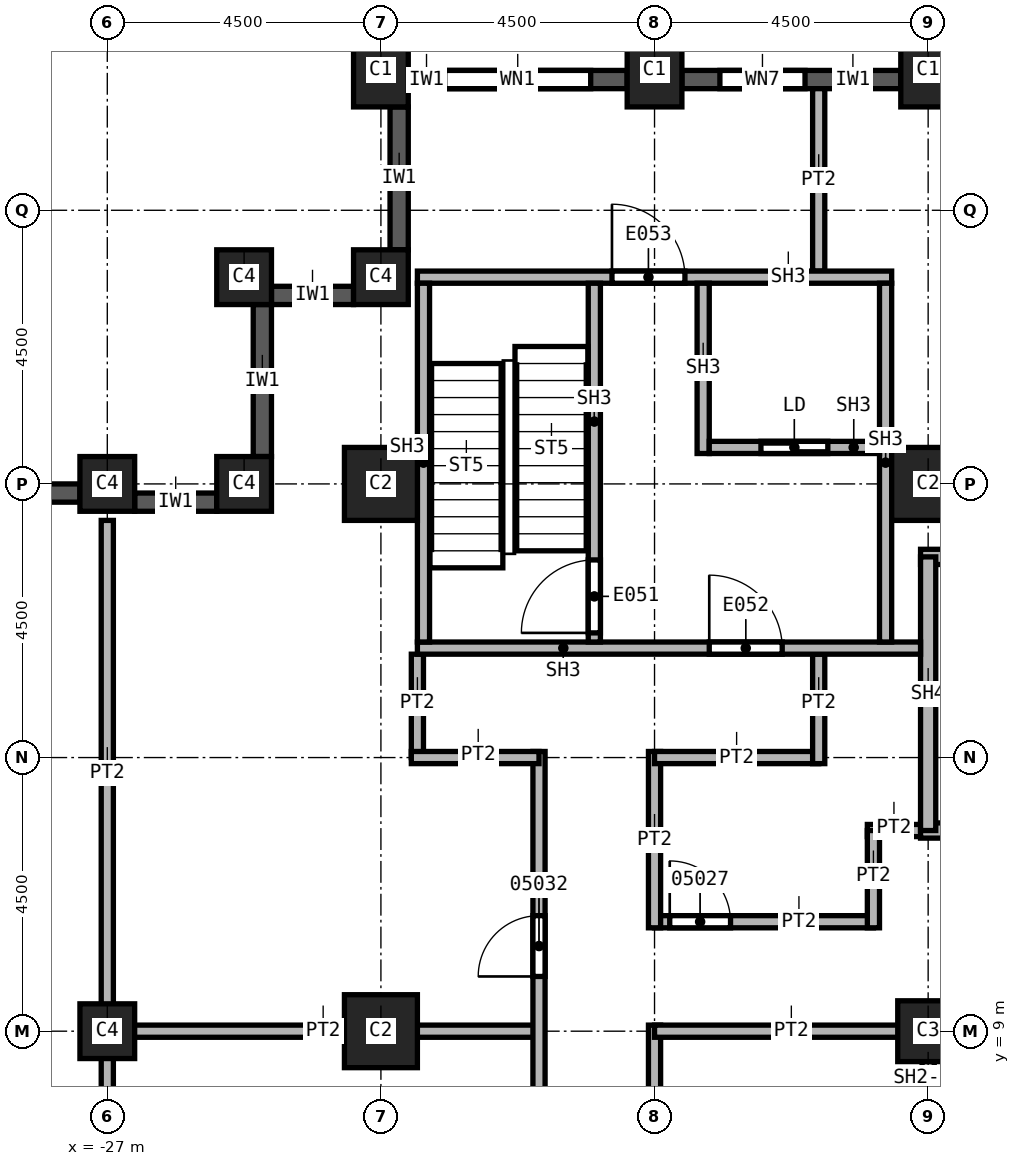
"""IFC4 building model, lengths in metres.
Left out: names, types, materials, properties, quantities, classifications, styles, units other than length and angle.
Written with IfcOpenShell. Run it as: python <this file> out.ifc"""

import sys

from ifc_helpers import new_model, si_unit, direction, frame, frame_2d, origin, origin_2d, place, context, subcontext, project, spatial, rectangle, extrude, element, fill, save


model = new_model("IFC4")
c1 = context("Model", 3, precision=1e-05, world=origin(), true_north=direction((0.0, 1.0)))
c2 = subcontext(c1, "Body", "Model", "MODEL_VIEW")
j1 = project(units=[si_unit("LENGTHUNIT", "METRE"), si_unit("PLANEANGLEUNIT", "RADIAN")], contexts=[c1])
p1 = place(None, origin())
s1 = spatial("IfcSite", under=j1, at=p1, CompositionType="ELEMENT")
p2 = place(p1, origin())
s2 = spatial("IfcBuilding", under=s1, at=p2, CompositionType="ELEMENT")
p3 = place(p2, frame((0.0, 0.0, 112.0)))
s3 = spatial("IfcBuildingStorey", under=s2, at=p3, CompositionType="ELEMENT", Elevation=112.0)
for number, where, z_axis, x_axis in (
    (1, (-13.5, 18.0, 0.0), (0.0, 0.0, 1.0), (1.0, 0.0, 0.0)),
    (2, (-22.5, 9.0, 0.0), (0.0, 0.0, 1.0), (1.0, 0.0, 0.0)),
    (3, (-22.5, 18.0, 0.0), (0.0, 0.0, 1.0), (1.0, 0.0, 0.0)),
):
    element("IfcColumn", number, at=place(p3, frame(where, z_axis=z_axis, x_axis=x_axis)), inside=s3, PredefinedType="COLUMN", context=c2, shape_type="SweptSolid", body=[
        extrude(rectangle(XDim=1.2, YDim=1.2, at=origin_2d()), origin(), (0.0, 0.0, 1.0), 3.7),
    ])
p4 = place(p3, frame((-13.5, 9.0, 0.0), z_axis=(0.0, 0.0, 1.0), x_axis=(1.0, 0.0, 0.0)))
e4 = element("IfcColumn", 4, at=p4, inside=s3, PredefinedType="COLUMN", context=c2, shape_type="SweptSolid", body=[
    extrude(rectangle(XDim=1.0, YDim=1.0, at=origin_2d()), origin(), (0.0, 0.0, 1.0), 3.7),
])
for number, where, z_axis, x_axis in (
    (5, (-13.5, 24.8, 0.0), (0.0, 0.0, 1.0), (1.0, 0.0, 0.0)),
    (6, (-18.0, 24.8, 0.0), (0.0, 0.0, 1.0), (1.0, 0.0, 0.0)),
    (7, (-22.5, 24.8, 0.0), (0.0, 0.0, 1.0), (1.0, 0.0, 0.0)),
):
    element("IfcColumn", number, at=place(p3, frame(where, z_axis=z_axis, x_axis=x_axis)), inside=s3, PredefinedType="COLUMN", context=c2, shape_type="SweptSolid", body=[
        extrude(rectangle(XDim=0.9, YDim=1.2, at=origin_2d()), origin(), (0.0, 0.0, 1.0), 3.7),
    ])
for number, where, z_axis, x_axis in (
    (8, (-27.0, 9.0, 0.0), (0.0, 0.0, 1.0), (1.0, 0.0, 0.0)),
    (9, (-27.0, 18.0, 0.0), (0.0, 0.0, 1.0), (1.0, 0.0, 0.0)),
    (10, (-22.5, 21.4, 0.0), (0.0, 0.0, 1.0), (1.0, 0.0, 0.0)),
    (11, (-24.75, 21.4, 0.0), (0.0, 0.0, 1.0), (1.0, 0.0, 0.0)),
    (12, (-24.75, 18.0, 0.0), (0.0, 0.0, 1.0), (1.0, 0.0, 0.0)),
):
    element("IfcColumn", number, at=place(p3, frame(where, z_axis=z_axis, x_axis=x_axis)), inside=s3, PredefinedType="COLUMN", context=c2, shape_type="SweptSolid", body=[
        extrude(rectangle(XDim=0.9, YDim=0.9, at=origin_2d()), origin(), (0.0, 0.0, 1.0), 3.7),
    ])
p5 = place(p3, frame((-22.2, 24.2, 0.0), z_axis=(0.0, 0.0, 1.0), x_axis=(0.0, -1.0, 0.0)))
e13 = element("IfcWall", 13, at=p5, inside=s3, PredefinedType="SOLIDWALL", context=c2, shape_type="SweptSolid", body=[
    extrude(rectangle(XDim=2.35, YDim=0.3, at=frame_2d((1.175, 0.0))), origin(), (0.0, 0.0, 1.0), 3.1),
])
p6 = place(p3, frame((-22.95, 21.1, 0.0), z_axis=(0.0, 0.0, 1.0), x_axis=(-1.0, 0.0, 0.0)))
e14 = element("IfcWall", 14, at=p6, inside=s3, PredefinedType="SOLIDWALL", context=c2, shape_type="SweptSolid", body=[
    extrude(rectangle(XDim=1.35, YDim=0.3, at=frame_2d((0.675, 0.0))), origin(), (0.0, 0.0, 1.0), 3.1),
])
p7 = place(p3, frame((-24.45, 20.95, 0.0), z_axis=(0.0, 0.0, 1.0), x_axis=(0.0, -1.0, 0.0)))
e15 = element("IfcWall", 15, at=p7, inside=s3, PredefinedType="SOLIDWALL", context=c2, shape_type="SweptSolid", body=[
    extrude(rectangle(XDim=2.5, YDim=0.3, at=frame_2d((1.25, 0.0))), origin(), (0.0, 0.0, 1.0), 3.1),
])
p8 = place(p3, frame((-25.2, 17.7, 0.0), z_axis=(0.0, 0.0, 1.0), x_axis=(-1.0, 0.0, 0.0)))
e16 = element("IfcWall", 16, at=p8, inside=s3, PredefinedType="SOLIDWALL", context=c2, shape_type="SweptSolid", body=[
    extrude(rectangle(XDim=1.35, YDim=0.3, at=frame_2d((0.675, 0.0))), origin(), (0.0, 0.0, 1.0), 3.1),
])
p9 = place(p3, frame((-27.45, 17.85, 0.0), z_axis=(0.0, 0.0, 1.0), x_axis=(-1.0, 0.0, 0.0)))
e17 = element("IfcWall", 17, at=p9, inside=s3, PredefinedType="SOLIDWALL", context=c2, shape_type="SweptSolid", body=[
    extrude(rectangle(XDim=3.6, YDim=0.3, at=frame_2d((1.8, 0.0))), origin(), (0.0, 0.0, 1.0), 3.1),
])
p10 = place(p9, frame((0.6, 0.0, 0.8)))
e18 = element("IfcOpeningElement", 18, at=p10, cuts=e17, PredefinedType="OPENING", context=c2, shape_type="SweptSolid", body=[
    extrude(rectangle(XDim=2.4, YDim=1.95, at=frame_2d((1.2, 0.975))), frame((0.0, 0.15, 0.0), z_axis=(0.0, -1.0, 0.0), x_axis=(1.0, 0.0, 0.0)), (0.0, 0.0, 1.0), 0.3),
])
p11 = place(p3, frame((-13.95, 24.65, 0.0), z_axis=(0.0, 0.0, 1.0), x_axis=(-1.0, 0.0, 0.0)))
e19 = element("IfcWall", 19, at=p11, inside=s3, PredefinedType="SOLIDWALL", context=c2, shape_type="SweptSolid", body=[
    extrude(rectangle(XDim=3.6, YDim=0.3, at=frame_2d((1.8, 0.0))), origin(), (0.0, 0.0, 1.0), 3.1),
])
p12 = place(p11, frame((1.575, 0.0, 0.8)))
e20 = element("IfcOpeningElement", 20, at=p12, cuts=e19, PredefinedType="OPENING", context=c2, shape_type="SweptSolid", body=[
    extrude(rectangle(XDim=1.4, YDim=1.95, at=frame_2d((0.7, 0.975))), frame((0.0, 0.15, 0.0), z_axis=(0.0, -1.0, 0.0), x_axis=(1.0, 0.0, 0.0)), (0.0, 0.0, 1.0), 0.3),
])
p13 = place(p3, frame((-18.45, 24.65, 0.0), z_axis=(0.0, 0.0, 1.0), x_axis=(-1.0, 0.0, 0.0)))
e21 = element("IfcWall", 21, at=p13, inside=s3, PredefinedType="SOLIDWALL", context=c2, shape_type="SweptSolid", body=[
    extrude(rectangle(XDim=3.6, YDim=0.3, at=frame_2d((1.8, 0.0))), origin(), (0.0, 0.0, 1.0), 3.1),
])
p14 = place(p13, frame((0.6, 0.0, 0.8)))
e22 = element("IfcOpeningElement", 22, at=p14, cuts=e21, PredefinedType="OPENING", context=c2, shape_type="SweptSolid", body=[
    extrude(rectangle(XDim=2.4, YDim=1.95, at=frame_2d((1.2, 0.975))), frame((0.0, 0.15, 0.0), z_axis=(0.0, -1.0, 0.0), x_axis=(1.0, 0.0, 0.0)), (0.0, 0.0, 1.0), 0.3),
])
p15 = place(p3, frame((-27.1, 9.0, 0.0), z_axis=(0.0, 0.0, 1.0), x_axis=(1.0, 0.0, 0.0)))
e23 = element("IfcWall", 23, at=p15, inside=s3, PredefinedType="PARTITIONING", context=c2, shape_type="SweptSolid", body=[
    extrude(rectangle(XDim=7.2, YDim=0.2, at=frame_2d((3.6, 0.0))), origin(), (0.0, 0.0, 1.0), 3.7),
])
p16 = place(p3, frame((-27.0, 3.75, 0.0), z_axis=(0.0, 0.0, 1.0), x_axis=(0.0, 1.0, 0.0)))
e24 = element("IfcWall", 24, at=p16, inside=s3, PredefinedType="PARTITIONING", context=c2, shape_type="SweptSolid", body=[
    extrude(rectangle(XDim=13.65, YDim=0.2, at=frame_2d((6.825, 0.0))), origin(), (0.0, 0.0, 1.0), 3.7),
])
p17 = place(p3, frame((-21.9, 13.5, 0.0), z_axis=(0.0, 0.0, 1.0), x_axis=(0.0, 1.0, 0.0)))
e25 = element("IfcWall", 25, at=p17, inside=s3, PredefinedType="PARTITIONING", context=c2, shape_type="SweptSolid", body=[
    extrude(rectangle(XDim=1.7, YDim=0.2, at=frame_2d((0.85, 0.0))), origin(), (0.0, 0.0, 1.0), 3.7),
])
p18 = place(p3, frame((-19.9, 3.65, 0.0), z_axis=(0.0, 0.0, 1.0), x_axis=(0.0, 1.0, 0.0)))
e26 = element("IfcWall", 26, at=p18, inside=s3, PredefinedType="PARTITIONING", context=c2, shape_type="SweptSolid", body=[
    extrude(rectangle(XDim=9.95, YDim=0.2, at=frame_2d((4.975, 0.0))), origin(), (0.0, 0.0, 1.0), 3.7),
])
p19 = place(p18, frame((6.25, 0.0, 0.0)))
e27 = element("IfcOpeningElement", 27, at=p19, cuts=e26, PredefinedType="OPENING", context=c2, shape_type="SweptSolid", body=[
    extrude(rectangle(XDim=1.0, YDim=2.1, at=frame_2d((0.5, 1.05))), frame((0.0, 0.1, 0.0), z_axis=(0.0, -1.0, 0.0), x_axis=(1.0, 0.0, 0.0)), (0.0, 0.0, 1.0), 0.2),
])
p20 = place(p3, frame((-19.9, 13.5, 0.0), z_axis=(0.0, 0.0, 1.0), x_axis=(-1.0, 0.0, 0.0)))
e28 = element("IfcWall", 28, at=p20, inside=s3, PredefinedType="PARTITIONING", context=c2, shape_type="SweptSolid", body=[
    extrude(rectangle(XDim=2.1, YDim=0.2, at=frame_2d((1.05, 0.0))), origin(), (0.0, 0.0, 1.0), 3.7),
])
p21 = place(p3, frame((-18.0, 9.1, 0.0), z_axis=(0.0, 0.0, 1.0), x_axis=(0.0, -1.0, 0.0)))
e29 = element("IfcWall", 29, at=p21, inside=s3, PredefinedType="PARTITIONING", context=c2, shape_type="SweptSolid", body=[
    extrude(rectangle(XDim=18.2, YDim=0.2, at=frame_2d((9.1, 0.0))), origin(), (0.0, 0.0, 1.0), 3.7),
])
p22 = place(p21, frame((16.9, 0.0, 0.0)))
e30 = element("IfcOpeningElement", 30, at=p22, cuts=e29, PredefinedType="OPENING", context=c2, shape_type="SweptSolid", body=[
    extrude(rectangle(XDim=1.0, YDim=2.1, at=frame_2d((0.5, 1.05))), frame((0.0, 0.1, 0.0), z_axis=(0.0, -1.0, 0.0), x_axis=(1.0, 0.0, 0.0)), (0.0, 0.0, 1.0), 0.2),
])
p23 = place(p21, frame((7.3, 0.0, 0.0)))
e31 = element("IfcOpeningElement", 31, at=p23, cuts=e29, PredefinedType="OPENING", context=c2, shape_type="SweptSolid", body=[
    extrude(rectangle(XDim=1.0, YDim=2.1, at=frame_2d((0.5, 1.05))), frame((0.0, 0.1, 0.0), z_axis=(0.0, -1.0, 0.0), x_axis=(1.0, 0.0, 0.0)), (0.0, 0.0, 1.0), 0.2),
])
p24 = place(p3, frame((-18.0, 10.8, 0.0), z_axis=(0.0, 0.0, 1.0), x_axis=(1.0, 0.0, 0.0)))
e32 = element("IfcWall", 32, at=p24, inside=s3, PredefinedType="PARTITIONING", context=c2, shape_type="SweptSolid", body=[
    extrude(rectangle(XDim=3.6, YDim=0.2, at=frame_2d((1.8, 0.0))), origin(), (0.0, 0.0, 1.0), 3.7),
])
p25 = place(p24, frame((0.25, 0.0, 0.0)))
e33 = element("IfcOpeningElement", 33, at=p25, cuts=e32, PredefinedType="OPENING", context=c2, shape_type="SweptSolid", body=[
    extrude(rectangle(XDim=1.0, YDim=2.1, at=frame_2d((0.5, 1.05))), frame((0.0, 0.1, 0.0), z_axis=(0.0, -1.0, 0.0), x_axis=(1.0, 0.0, 0.0)), (0.0, 0.0, 1.0), 0.2),
])
p26 = place(p3, frame((-18.0, 13.6, 0.0), z_axis=(0.0, 0.0, 1.0), x_axis=(0.0, -1.0, 0.0)))
e34 = element("IfcWall", 34, at=p26, inside=s3, PredefinedType="PARTITIONING", context=c2, shape_type="SweptSolid", body=[
    extrude(rectangle(XDim=2.9, YDim=0.2, at=frame_2d((1.45, 0.0))), origin(), (0.0, 0.0, 1.0), 3.7),
])
p27 = place(p3, frame((-15.3, 13.5, 0.0), z_axis=(0.0, 0.0, 1.0), x_axis=(-1.0, 0.0, 0.0)))
e35 = element("IfcWall", 35, at=p27, inside=s3, PredefinedType="PARTITIONING", context=c2, shape_type="SweptSolid", body=[
    extrude(rectangle(XDim=2.7, YDim=0.2, at=frame_2d((1.35, 0.0))), origin(), (0.0, 0.0, 1.0), 3.7),
])
p28 = place(p3, frame((-15.3, 15.2, 0.0), z_axis=(0.0, 0.0, 1.0), x_axis=(0.0, -1.0, 0.0)))
e36 = element("IfcWall", 36, at=p28, inside=s3, PredefinedType="PARTITIONING", context=c2, shape_type="SweptSolid", body=[
    extrude(rectangle(XDim=1.8, YDim=0.2, at=frame_2d((0.9, 0.0))), origin(), (0.0, 0.0, 1.0), 3.7),
])
p29 = place(p3, frame((-15.3, 24.5, 0.0), z_axis=(0.0, 0.0, 1.0), x_axis=(0.0, -1.0, 0.0)))
e37 = element("IfcWall", 37, at=p29, inside=s3, PredefinedType="PARTITIONING", context=c2, shape_type="SweptSolid", body=[
    extrude(rectangle(XDim=3.0, YDim=0.2, at=frame_2d((1.5, 0.0))), origin(), (0.0, 0.0, 1.0), 3.7),
])
p30 = place(p3, frame((-14.5, 12.3, 0.0), z_axis=(0.0, 0.0, 1.0), x_axis=(1.0, 0.0, 0.0)))
e38 = element("IfcWall", 38, at=p30, inside=s3, PredefinedType="PARTITIONING", context=c2, shape_type="SweptSolid", body=[
    extrude(rectangle(XDim=1.125, YDim=0.2, at=frame_2d((0.562, 0.0))), origin(), (0.0, 0.0, 1.0), 3.7),
])
p31 = place(p3, frame((-13.5, 9.0, 0.0), z_axis=(0.0, 0.0, 1.0), x_axis=(-1.0, 0.0, 0.0)))
e39 = element("IfcWall", 39, at=p31, inside=s3, PredefinedType="PARTITIONING", context=c2, shape_type="SweptSolid", body=[
    extrude(rectangle(XDim=4.5, YDim=0.2, at=frame_2d((2.25, 0.0))), origin(), (0.0, 0.0, 1.0), 3.7),
])
p32 = place(p3, frame((-14.4, 10.7, 0.0), z_axis=(0.0, 0.0, 1.0), x_axis=(0.0, 1.0, 0.0)))
e40 = element("IfcWall", 40, at=p32, inside=s3, PredefinedType="PARTITIONING", context=c2, shape_type="SweptSolid", body=[
    extrude(rectangle(XDim=1.6, YDim=0.2, at=frame_2d((0.8, 0.0))), origin(), (0.0, 0.0, 1.0), 3.7),
])
p33 = place(p3, frame((-13.6, 9.0, 0.0), z_axis=(0.0, 0.0, 1.0), x_axis=(1.0, 0.0, 0.0)))
e41 = element("IfcWall", 41, at=p33, inside=s3, PredefinedType="SOLIDWALL", context=c2, shape_type="SweptSolid", body=[
    extrude(rectangle(XDim=3.1, YDim=0.2, at=frame_2d((1.55, 0.0))), origin(), (0.0, 0.0, 1.0), 2.938),
])
p34 = place(p33, frame((0.85, 0.0, 0.0)))
e42 = element("IfcOpeningElement", 42, at=p34, cuts=e41, PredefinedType="OPENING", context=c2, shape_type="SweptSolid", body=[
    extrude(rectangle(XDim=1.1, YDim=2.1, at=frame_2d((0.55, 1.05))), frame((0.0, 0.1, 0.0), z_axis=(0.0, -1.0, 0.0), x_axis=(1.0, 0.0, 0.0)), (0.0, 0.0, 1.0), 0.2),
])
p35 = place(p3, frame((-13.5, 7.5, 0.0), z_axis=(0.0, 0.0, 1.0), x_axis=(0.0, 1.0, 0.0)))
e43 = element("IfcWall", 43, at=p35, inside=s3, PredefinedType="SOLIDWALL", context=c2, shape_type="SweptSolid", body=[
    extrude(rectangle(XDim=1.6, YDim=0.2, at=frame_2d((0.8, 0.0))), origin(), (0.0, 0.0, 1.0), 2.938),
])
p36 = place(p3, frame((-13.625, 12.3, 0.0), z_axis=(0.0, 0.0, 1.0), x_axis=(1.0, 0.0, 0.0)))
e44 = element("IfcWall", 44, at=p36, inside=s3, PredefinedType="SOLIDWALL", context=c2, shape_type="SweptSolid", body=[
    extrude(rectangle(XDim=9.25, YDim=0.25, at=frame_2d((4.625, 0.0))), origin(), (0.0, 0.0, 1.0), 3.7),
])
p37 = place(p36, frame((0.85, 0.0, 0.0)))
e45 = element("IfcOpeningElement", 45, at=p37, cuts=e44, PredefinedType="OPENING", context=c2, shape_type="SweptSolid", body=[
    extrude(rectangle(XDim=1.2, YDim=2.1, at=frame_2d((0.6, 1.05))), frame((0.0, 0.125, 0.0), z_axis=(0.0, -1.0, 0.0), x_axis=(1.0, 0.0, 0.0)), (0.0, 0.0, 1.0), 0.25),
])
p38 = place(p3, frame((-13.625, 16.8, 0.0), z_axis=(0.0, 0.0, 1.0), x_axis=(1.0, 0.0, 0.0)))
e46 = element("IfcWall", 46, at=p38, inside=s3, PredefinedType="SOLIDWALL", context=c2, shape_type="SweptSolid", body=[
    extrude(rectangle(XDim=9.25, YDim=0.25, at=frame_2d((4.625, 0.0))), origin(), (0.0, 0.0, 1.0), 3.7),
])
p39 = place(p3, frame((-13.5, 12.3, 0.0), z_axis=(0.0, 0.0, 1.0), x_axis=(0.0, 1.0, 0.0)))
e47 = element("IfcWall", 47, at=p39, inside=s3, PredefinedType="SOLIDWALL", context=c2, shape_type="SweptSolid", body=[
    extrude(rectangle(XDim=4.5, YDim=0.25, at=frame_2d((2.25, 0.0))), origin(), (0.0, 0.0, 1.0), 3.7),
])
p40 = place(p3, frame((-21.9, 15.3, 0.0), z_axis=(0.0, 0.0, 1.0), x_axis=(1.0, 0.0, 0.0)))
e48 = element("IfcWall", 48, at=p40, inside=s3, PredefinedType="SOLIDWALL", context=c2, shape_type="SweptSolid", body=[
    extrude(rectangle(XDim=8.275, YDim=0.2, at=frame_2d((4.137, 0.0))), origin(), (0.0, 0.0, 1.0), 3.7),
])
p41 = place(p40, frame((4.8, 0.0, 0.0)))
e49 = element("IfcOpeningElement", 49, at=p41, cuts=e48, PredefinedType="OPENING", context=c2, shape_type="SweptSolid", body=[
    extrude(rectangle(XDim=1.2, YDim=2.1, at=frame_2d((0.6, 1.05))), frame((0.0, 0.1, 0.0), z_axis=(0.0, -1.0, 0.0), x_axis=(1.0, 0.0, 0.0)), (0.0, 0.0, 1.0), 0.2),
])
p42 = place(p3, frame((-21.9, 21.4, 0.0), z_axis=(0.0, 0.0, 1.0), x_axis=(1.0, 0.0, 0.0)))
e50 = element("IfcWall", 50, at=p42, inside=s3, PredefinedType="SOLIDWALL", context=c2, shape_type="SweptSolid", body=[
    extrude(rectangle(XDim=7.8, YDim=0.2, at=frame_2d((3.9, 0.0))), origin(), (0.0, 0.0, 1.0), 3.7),
])
p43 = place(p42, frame((3.2, 0.0, 0.0)))
e51 = element("IfcOpeningElement", 51, at=p43, cuts=e50, PredefinedType="OPENING", context=c2, shape_type="SweptSolid", body=[
    extrude(rectangle(XDim=1.2, YDim=2.1, at=frame_2d((0.6, 1.05))), frame((0.0, 0.1, 0.0), z_axis=(0.0, -1.0, 0.0), x_axis=(1.0, 0.0, 0.0)), (0.0, 0.0, 1.0), 0.2),
])
for number, where, z_axis, x_axis in (
    (52, (-21.8, 15.4, 0.0), (0.0, 0.0, 1.0), (0.0, 1.0, 0.0)),
    (53, (-14.2, 15.4, 0.0), (0.0, 0.0, 1.0), (0.0, 1.0, 0.0)),
):
    element("IfcWall", number, at=place(p3, frame(where, z_axis=z_axis, x_axis=x_axis)), inside=s3, PredefinedType="SOLIDWALL", context=c2, shape_type="SweptSolid", body=[
        extrude(rectangle(XDim=5.9, YDim=0.2, at=frame_2d((2.95, 0.0))), origin(), (0.0, 0.0, 1.0), 3.7),
    ])
p44 = place(p3, frame((-18.99, 15.4, 0.0), z_axis=(0.0, 0.0, 1.0), x_axis=(0.0, 1.0, 0.0)))
e54 = element("IfcWall", 54, at=p44, inside=s3, PredefinedType="SOLIDWALL", context=c2, shape_type="SweptSolid", body=[
    extrude(rectangle(XDim=5.9, YDim=0.2, at=frame_2d((2.95, 0.0))), origin(), (0.0, 0.0, 1.0), 3.7),
])
p45 = place(p44, frame((0.15, 0.0, 0.0)))
e55 = element("IfcOpeningElement", 55, at=p45, cuts=e54, PredefinedType="OPENING", context=c2, shape_type="SweptSolid", body=[
    extrude(rectangle(XDim=1.2, YDim=2.1, at=frame_2d((0.6, 1.05))), frame((0.0, 0.1, 0.0), z_axis=(0.0, -1.0, 0.0), x_axis=(1.0, 0.0, 0.0)), (0.0, 0.0, 1.0), 0.2),
])
p46 = place(p3, frame((-17.2, 18.5, 0.0), z_axis=(0.0, 0.0, 1.0), x_axis=(0.0, 1.0, 0.0)))
e56 = element("IfcWall", 56, at=p46, inside=s3, PredefinedType="SOLIDWALL", context=c2, shape_type="SweptSolid", body=[
    extrude(rectangle(XDim=2.8, YDim=0.2, at=frame_2d((1.4, 0.0))), origin(), (0.0, 0.0, 1.0), 3.7),
])
p47 = place(p3, frame((-17.1, 18.6, 0.0), z_axis=(0.0, 0.0, 1.0), x_axis=(1.0, 0.0, 0.0)))
e57 = element("IfcWall", 57, at=p47, inside=s3, PredefinedType="SOLIDWALL", context=c2, shape_type="SweptSolid", body=[
    extrude(rectangle(XDim=2.8, YDim=0.2, at=frame_2d((1.4, 0.0))), origin(), (0.0, 0.0, 1.0), 3.7),
])
p48 = place(p47, frame((0.85, 0.0, 0.0)))
e58 = element("IfcOpeningElement", 58, at=p48, cuts=e57, PredefinedType="OPENING", context=c2, shape_type="SweptSolid", body=[
    extrude(rectangle(XDim=1.1, YDim=2.1, at=frame_2d((0.55, 1.05))), frame((0.0, 0.1, 0.0), z_axis=(0.0, -1.0, 0.0), x_axis=(1.0, 0.0, 0.0)), (0.0, 0.0, 1.0), 0.2),
])
p49 = place(p14, origin())
e59 = element("IfcWindow", 59, at=p49, inside=s3, PartitioningType="SINGLE_PANEL", PredefinedType="WINDOW", context=c2, shape_type="SweptSolid", body=[
    extrude(rectangle(XDim=2.4, YDim=1.95, at=frame_2d((1.2, 0.975))), frame((0.0, 0.03, 0.0), z_axis=(0.0, -1.0, 0.0), x_axis=(1.0, 0.0, 0.0)), (0.0, 0.0, 1.0), 0.06),
])
fill(e22, e59)
p50 = place(p25, origin())
e60 = element("IfcDoor", 60, at=p50, inside=s3, OperationType="SINGLE_SWING_RIGHT", PredefinedType="DOOR", context=c2, shape_type="SweptSolid", body=[
    extrude(rectangle(XDim=1.0, YDim=2.1, at=frame_2d((0.5, 1.05))), frame((0.0, 0.025, 0.0), z_axis=(0.0, -1.0, 0.0), x_axis=(1.0, 0.0, 0.0)), (0.0, 0.0, 1.0), 0.05),
])
fill(e33, e60)
p51 = place(p19, origin())
e61 = element("IfcDoor", 61, at=p51, inside=s3, OperationType="SINGLE_SWING_LEFT", PredefinedType="DOOR", context=c2, shape_type="SweptSolid", body=[
    extrude(rectangle(XDim=1.0, YDim=2.1, at=frame_2d((0.5, 1.05))), frame((0.0, 0.025, 0.0), z_axis=(0.0, -1.0, 0.0), x_axis=(1.0, 0.0, 0.0)), (0.0, 0.0, 1.0), 0.05),
])
fill(e27, e61)
p52 = place(p45, origin())
e62 = element("IfcDoor", 62, at=p52, inside=s3, OperationType="SINGLE_SWING_LEFT", PredefinedType="DOOR", context=c2, shape_type="SweptSolid", body=[
    extrude(rectangle(XDim=1.2, YDim=2.1, at=frame_2d((0.6, 1.05))), frame((0.0, 0.025, 0.0), z_axis=(0.0, -1.0, 0.0), x_axis=(1.0, 0.0, 0.0)), (0.0, 0.0, 1.0), 0.05),
])
fill(e55, e62)
p53 = place(p48, origin())
e63 = element("IfcDoor", 63, at=p53, inside=s3, OperationType="SLIDING_TO_LEFT", PredefinedType="DOOR", context=c2, shape_type="SweptSolid", body=[
    extrude(rectangle(XDim=1.1, YDim=2.1, at=frame_2d((0.55, 1.05))), frame((0.0, 0.025, 0.0), z_axis=(0.0, -1.0, 0.0), x_axis=(1.0, 0.0, 0.0)), (0.0, 0.0, 1.0), 0.05),
])
fill(e58, e63)
p54 = place(p41, origin())
e64 = element("IfcDoor", 64, at=p54, inside=s3, OperationType="SINGLE_SWING_RIGHT", PredefinedType="DOOR", context=c2, shape_type="SweptSolid", body=[
    extrude(rectangle(XDim=1.2, YDim=2.1, at=frame_2d((0.6, 1.05))), frame((0.0, 0.025, 0.0), z_axis=(0.0, -1.0, 0.0), x_axis=(1.0, 0.0, 0.0)), (0.0, 0.0, 1.0), 0.05),
])
fill(e49, e64)
p55 = place(p43, origin())
e65 = element("IfcDoor", 65, at=p55, inside=s3, OperationType="SINGLE_SWING_LEFT", PredefinedType="DOOR", context=c2, shape_type="SweptSolid", body=[
    extrude(rectangle(XDim=1.2, YDim=2.1, at=frame_2d((0.6, 1.05))), frame((0.0, 0.025, 0.0), z_axis=(0.0, -1.0, 0.0), x_axis=(1.0, 0.0, 0.0)), (0.0, 0.0, 1.0), 0.05),
])
fill(e51, e65)
p56 = place(p12, origin())
e66 = element("IfcWindow", 66, at=p56, inside=s3, PartitioningType="SINGLE_PANEL", PredefinedType="WINDOW", context=c2, shape_type="SweptSolid", body=[
    extrude(rectangle(XDim=1.4, YDim=1.95, at=frame_2d((0.7, 0.975))), frame((0.0, 0.03, 0.0), z_axis=(0.0, -1.0, 0.0), x_axis=(1.0, 0.0, 0.0)), (0.0, 0.0, 1.0), 0.06),
])
fill(e20, e66)
save(model, sys.argv[1])
